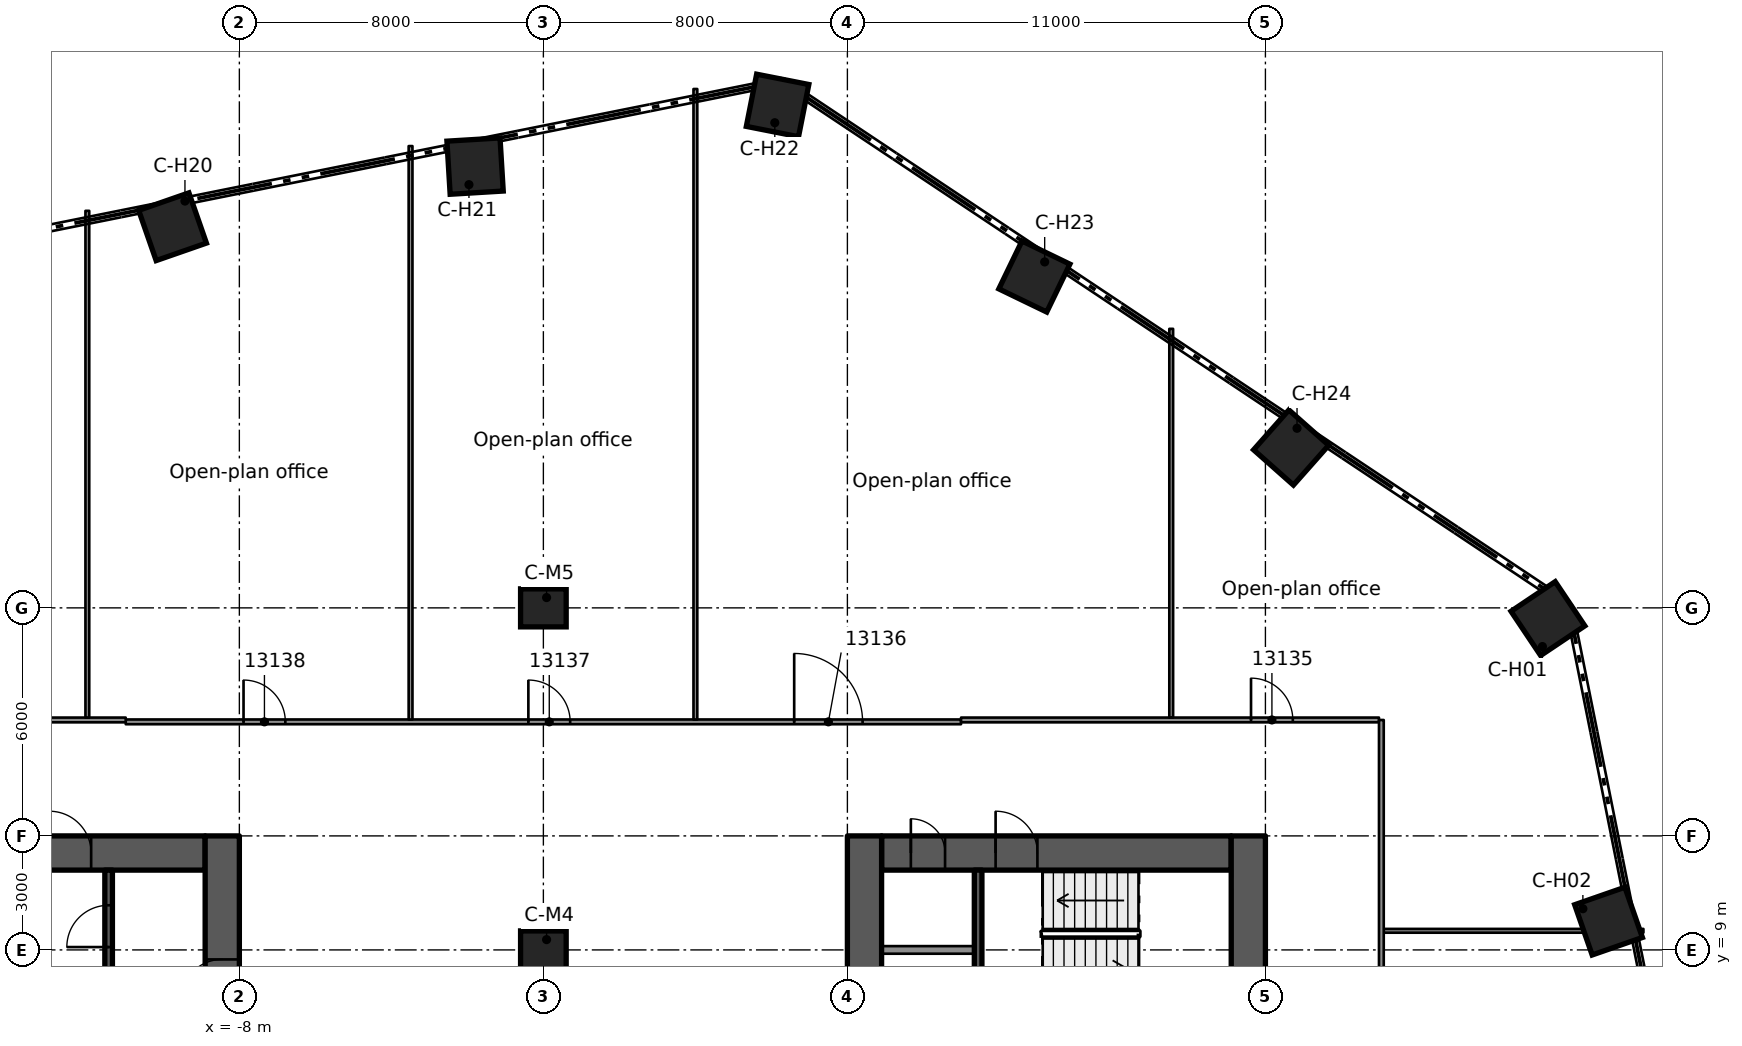
"""IFC4 building model, lengths in metres.
Left out: names, types, materials, properties, quantities, classifications, styles, units other than length and angle.
Written with IfcOpenShell. Run it as: python <this file> out.ifc"""

import sys

from ifc_helpers import new_model, si_unit, direction, frame, frame_2d, origin, origin_2d, place, context, subcontext, project, spatial, rectangle, extrude, element, fill, save


model = new_model("IFC4")
c1 = context("Model", 3, precision=1e-05, world=origin(), true_north=direction((0.0, 1.0)))
c2 = subcontext(c1, "Body", "Model", "MODEL_VIEW")
j1 = project(units=[si_unit("LENGTHUNIT", "METRE"), si_unit("PLANEANGLEUNIT", "RADIAN")], contexts=[c1])
p1 = place(None, origin())
s1 = spatial("IfcSite", under=j1, at=p1, CompositionType="ELEMENT")
p2 = place(p1, origin())
s2 = spatial("IfcBuilding", under=s1, at=p2, CompositionType="ELEMENT")
p3 = place(p2, frame((0.0, 0.0, 62.3)))
s3 = spatial("IfcBuildingStorey", under=s2, at=p3, CompositionType="ELEMENT", Elevation=62.3)
p4 = place(p3, frame((-18.1, 11.55, 0.0), z_axis=(0.0, 0.0, 1.0), x_axis=(1.0, 0.0, 0.0)))
e1 = element("IfcWall", 1, at=p4, inside=s3, PredefinedType="SHEAR", context=c2, shape_type="SweptSolid", body=[
    extrude(rectangle(XDim=9.2, YDim=0.9, at=frame_2d((4.6, 0.0))), origin(), (0.0, 0.0, 1.0), 3.5),
])
p5 = place(p4, frame((5.1, 0.0, 0.0)))
e2 = element("IfcOpeningElement", 2, at=p5, cuts=e1, PredefinedType="OPENING", context=c2, shape_type="SweptSolid", body=[
    extrude(rectangle(XDim=1.1, YDim=2.1, at=frame_2d((0.55, 1.05))), frame((0.0, 0.46, 0.0), z_axis=(0.0, -1.0, 0.0), x_axis=(1.0, 0.0, 0.0)), (0.0, 0.0, 1.0), 0.92),
])
p6 = place(p3, frame((-8.45, -12.0, 0.0), z_axis=(0.0, 0.0, 1.0), x_axis=(0.0, 1.0, 0.0)))
e3 = element("IfcWall", 3, at=p6, inside=s3, PredefinedType="SHEAR", context=c2, shape_type="SweptSolid", body=[
    extrude(rectangle(XDim=24.0, YDim=0.9, at=frame_2d((12.0, 0.0))), origin(), (0.0, 0.0, 1.0), 3.5),
])
p7 = place(p6, frame((9.6, 0.0, 0.0)))
e4 = element("IfcOpeningElement", 4, at=p7, cuts=e3, PredefinedType="OPENING", context=c2, shape_type="SweptSolid", body=[
    extrude(rectangle(XDim=1.8, YDim=2.1, at=frame_2d((0.9, 1.05))), frame((0.0, 0.46, 0.0), z_axis=(0.0, -1.0, 0.0), x_axis=(1.0, 0.0, 0.0)), (0.0, 0.0, 1.0), 0.92),
])
p8 = place(p6, frame((19.65, 0.0, 0.0)))
e5 = element("IfcOpeningElement", 5, at=p8, cuts=e3, PredefinedType="OPENING", context=c2, shape_type="SweptSolid", body=[
    extrude(rectangle(XDim=1.1, YDim=2.1, at=frame_2d((0.55, 1.05))), frame((0.0, 0.46, 0.0), z_axis=(0.0, -1.0, 0.0), x_axis=(1.0, 0.0, 0.0)), (0.0, 0.0, 1.0), 0.92),
])
p9 = place(p3, frame((8.9, 11.55, 0.0), z_axis=(0.0, 0.0, 1.0), x_axis=(1.0, 0.0, 0.0)))
e6 = element("IfcWall", 6, at=p9, inside=s3, PredefinedType="SHEAR", context=c2, shape_type="SweptSolid", body=[
    extrude(rectangle(XDim=9.2, YDim=0.9, at=frame_2d((4.6, 0.0))), origin(), (0.0, 0.0, 1.0), 3.5),
])
p10 = place(p9, frame((3.0, 0.0, 0.0)))
e7 = element("IfcOpeningElement", 7, at=p10, cuts=e6, PredefinedType="OPENING", context=c2, shape_type="SweptSolid", body=[
    extrude(rectangle(XDim=1.1, YDim=2.1, at=frame_2d((0.55, 1.05))), frame((0.0, 0.46, 0.0), z_axis=(0.0, -1.0, 0.0), x_axis=(1.0, 0.0, 0.0)), (0.0, 0.0, 1.0), 0.92),
])
p11 = place(p9, frame((0.77, 0.0, 0.0)))
e8 = element("IfcOpeningElement", 8, at=p11, cuts=e6, PredefinedType="OPENING", context=c2, shape_type="SweptSolid", body=[
    extrude(rectangle(XDim=0.9, YDim=2.1, at=frame_2d((0.45, 1.05))), frame((0.0, 0.46, 0.0), z_axis=(0.0, -1.0, 0.0), x_axis=(1.0, 0.0, 0.0)), (0.0, 0.0, 1.0), 0.92),
])
p12 = place(p3, frame((8.45, -12.0, 0.0), z_axis=(0.0, 0.0, 1.0), x_axis=(0.0, 1.0, 0.0)))
e9 = element("IfcWall", 9, at=p12, inside=s3, PredefinedType="SHEAR", context=c2, shape_type="SweptSolid", body=[
    extrude(rectangle(XDim=24.0, YDim=0.9, at=frame_2d((12.0, 0.0))), origin(), (0.0, 0.0, 1.0), 3.5),
])
p13 = place(p12, frame((12.6, 0.0, 0.0)))
e10 = element("IfcOpeningElement", 10, at=p13, cuts=e9, PredefinedType="OPENING", context=c2, shape_type="SweptSolid", body=[
    extrude(rectangle(XDim=1.8, YDim=2.1, at=frame_2d((0.9, 1.05))), frame((0.0, 0.46, 0.0), z_axis=(0.0, -1.0, 0.0), x_axis=(1.0, 0.0, 0.0)), (0.0, 0.0, 1.0), 0.92),
])
p14 = place(p12, frame((3.25, 0.0, 0.0)))
e11 = element("IfcOpeningElement", 11, at=p14, cuts=e9, PredefinedType="OPENING", context=c2, shape_type="SweptSolid", body=[
    extrude(rectangle(XDim=1.1, YDim=2.1, at=frame_2d((0.55, 1.05))), frame((0.0, 0.46, 0.0), z_axis=(0.0, -1.0, 0.0), x_axis=(1.0, 0.0, 0.0)), (0.0, 0.0, 1.0), 0.92),
])
p15 = place(p3, frame((18.55, -12.0, 0.0), z_axis=(0.0, 0.0, 1.0), x_axis=(0.0, 1.0, 0.0)))
e12 = element("IfcWall", 12, at=p15, inside=s3, PredefinedType="SHEAR", context=c2, shape_type="SweptSolid", body=[
    extrude(rectangle(XDim=24.0, YDim=0.9, at=frame_2d((12.0, 0.0))), origin(), (0.0, 0.0, 1.0), 3.5),
])
p16 = place(p15, frame((12.1, 0.0, 0.0)))
e13 = element("IfcOpeningElement", 13, at=p16, cuts=e12, PredefinedType="OPENING", context=c2, shape_type="SweptSolid", body=[
    extrude(rectangle(XDim=1.8, YDim=2.1, at=frame_2d((0.9, 1.05))), frame((0.0, 0.46, 0.0), z_axis=(0.0, -1.0, 0.0), x_axis=(1.0, 0.0, 0.0)), (0.0, 0.0, 1.0), 0.92),
])
for number, where, z_axis, x_axis in (
    (14, (26.434, 17.718, 0.0), (0.0, 0.0, 1.0), (0.831, 0.557, 0.0)),
    (15, (28.029, 9.758, 0.0), (0.0, 0.0, 1.0), (0.944, 0.329, 0.0)),
    (16, (-9.758, 28.029, 0.0), (0.0, 0.0, 1.0), (-0.329, 0.944, 0.0)),
    (17, (-1.797, 29.624, 0.0), (0.0, 0.0, 1.0), (-0.061, 0.998, 0.0)),
    (18, (6.163, 31.22, 0.0), (0.0, 0.0, 1.0), (0.194, 0.981, 0.0)),
    (19, (12.92, 26.719, 0.0), (0.0, 0.0, 1.0), (0.435, 0.9, 0.0)),
    (20, (19.677, 22.219, 0.0), (0.0, 0.0, 1.0), (0.663, 0.749, 0.0)),
):
    element("IfcColumn", number, at=place(p3, frame(where, z_axis=z_axis, x_axis=x_axis)), inside=s3, PredefinedType="COLUMN", context=c2, shape_type="SweptSolid", body=[
        extrude(rectangle(XDim=1.4, YDim=1.4, at=origin_2d()), origin(), (0.0, 0.0, 1.0), 3.5),
    ])
for number, where, z_axis, x_axis in (
    (21, (0.0, 9.0, 0.0), (0.0, 0.0, 1.0), (1.0, 0.0, 0.0)),
    (22, (0.0, 18.0, 0.0), (0.0, 0.0, 1.0), (1.0, 0.0, 0.0)),
):
    element("IfcColumn", number, at=place(p3, frame(where, z_axis=z_axis, x_axis=x_axis)), inside=s3, PredefinedType="COLUMN", context=c2, shape_type="SweptSolid", body=[
        extrude(rectangle(XDim=1.2, YDim=1.0, at=origin_2d()), origin(), (0.0, 0.0, 1.0), 3.5),
    ])
p17 = place(p3, frame((-11.44, 6.975, 0.0), z_axis=(0.0, 0.0, 1.0), x_axis=(0.0, 1.0, 0.0)))
e23 = element("IfcWall", 23, at=p17, inside=s3, PredefinedType="SOLIDWALL", context=c2, shape_type="SweptSolid", body=[
    extrude(rectangle(XDim=4.125, YDim=0.2, at=frame_2d((2.062, 0.0))), origin(), (0.0, 0.0, 1.0), 3.09),
])
p18 = place(p17, frame((2.1, 0.0, 0.0)))
e24 = element("IfcOpeningElement", 24, at=p18, cuts=e23, PredefinedType="OPENING", context=c2, shape_type="SweptSolid", body=[
    extrude(rectangle(XDim=1.1, YDim=2.1, at=frame_2d((0.55, 1.05))), frame((0.0, 0.11, 0.0), z_axis=(0.0, -1.0, 0.0), x_axis=(1.0, 0.0, 0.0)), (0.0, 0.0, 1.0), 0.22),
])
p19 = place(p3, frame((11.44, 11.1, 0.0), z_axis=(0.0, 0.0, 1.0), x_axis=(0.0, -1.0, 0.0)))
e25 = element("IfcWall", 25, at=p19, inside=s3, PredefinedType="SOLIDWALL", context=c2, shape_type="SweptSolid", body=[
    extrude(rectangle(XDim=4.125, YDim=0.2, at=frame_2d((2.062, 0.0))), origin(), (0.0, 0.0, 1.0), 3.09),
])
p20 = place(p3, frame((8.9, 9.0, 0.0), z_axis=(0.0, 0.0, 1.0), x_axis=(1.0, 0.0, 0.0)))
e26 = element("IfcWall", 26, at=p20, inside=s3, PredefinedType="PARTITIONING", context=c2, shape_type="SweptSolid", body=[
    extrude(rectangle(XDim=2.44, YDim=0.2, at=frame_2d((1.22, 0.0))), origin(), (0.0, 0.0, 1.0), 3.09),
])
p21 = place(p3, frame((22.113, 9.503, 0.0), z_axis=(0.0, 0.0, 1.0), x_axis=(1.0, 0.0, 0.0)))
e27 = element("IfcWall", 27, at=p21, inside=s3, PredefinedType="PARTITIONING", context=c2, shape_type="SweptSolid", body=[
    extrude(rectangle(XDim=6.834, YDim=0.1, at=frame_2d((3.417, 0.0))), origin(), (0.0, 0.0, 1.0), 3.08),
])
p22 = place(p3, frame((-10.99, 15.001, 0.0), z_axis=(0.0, 0.0, 1.0), x_axis=(1.0, 0.0, 0.0)))
e28 = element("IfcWall", 28, at=p22, inside=s3, PredefinedType="PARTITIONING", context=c2, shape_type="SweptSolid", body=[
    extrude(rectangle(XDim=21.98, YDim=0.125, at=frame_2d((10.99, 0.0))), origin(), (0.0, 0.0, 1.0), 3.08),
])
p23 = place(p22, frame((17.59, 0.0, 0.0)))
e29 = element("IfcOpeningElement", 29, at=p23, cuts=e28, PredefinedType="OPENING", context=c2, shape_type="SweptSolid", body=[
    extrude(rectangle(XDim=1.8, YDim=2.1, at=frame_2d((0.9, 1.05))), frame((0.0, 0.073, 0.0), z_axis=(0.0, -1.0, 0.0), x_axis=(1.0, 0.0, 0.0)), (0.0, 0.0, 1.0), 0.145),
])
p24 = place(p22, frame((10.595, 0.0, 0.0)))
e30 = element("IfcOpeningElement", 30, at=p24, cuts=e28, PredefinedType="OPENING", context=c2, shape_type="SweptSolid", body=[
    extrude(rectangle(XDim=1.1, YDim=2.1, at=frame_2d((0.55, 1.05))), frame((0.0, 0.073, 0.0), z_axis=(0.0, -1.0, 0.0), x_axis=(1.0, 0.0, 0.0)), (0.0, 0.0, 1.0), 0.145),
])
p25 = place(p22, frame((3.1, 0.0, 0.0)))
e31 = element("IfcOpeningElement", 31, at=p25, cuts=e28, PredefinedType="OPENING", context=c2, shape_type="SweptSolid", body=[
    extrude(rectangle(XDim=1.1, YDim=2.1, at=frame_2d((0.55, 1.05))), frame((0.0, 0.073, 0.0), z_axis=(0.0, -1.0, 0.0), x_axis=(1.0, 0.0, 0.0)), (0.0, 0.0, 1.0), 0.145),
])
p26 = place(p3, frame((-21.988, 15.051, 0.0), z_axis=(0.0, 0.0, 1.0), x_axis=(1.0, 0.0, 0.0)))
e32 = element("IfcWall", 32, at=p26, inside=s3, PredefinedType="PARTITIONING", context=c2, shape_type="SweptSolid", body=[
    extrude(rectangle(XDim=10.997, YDim=0.125, at=frame_2d((5.499, 0.0))), origin(), (0.0, 0.0, 1.0), 3.08),
])
p27 = place(p26, frame((4.038, 0.0, 0.0)))
e33 = element("IfcOpeningElement", 33, at=p27, cuts=e32, PredefinedType="OPENING", context=c2, shape_type="SweptSolid", body=[
    extrude(rectangle(XDim=1.8, YDim=2.1, at=frame_2d((0.9, 1.05))), frame((0.0, 0.073, 0.0), z_axis=(0.0, -1.0, 0.0), x_axis=(1.0, 0.0, 0.0)), (0.0, 0.0, 1.0), 0.145),
])
p28 = place(p3, frame((10.991, 15.051, 0.0), z_axis=(0.0, 0.0, 1.0), x_axis=(1.0, 0.0, 0.0)))
e34 = element("IfcWall", 34, at=p28, inside=s3, PredefinedType="PARTITIONING", context=c2, shape_type="SweptSolid", body=[
    extrude(rectangle(XDim=10.997, YDim=0.125, at=frame_2d((5.499, 0.0))), origin(), (0.0, 0.0, 1.0), 3.08),
])
p29 = place(p28, frame((7.63, 0.0, 0.0)))
e35 = element("IfcOpeningElement", 35, at=p29, cuts=e34, PredefinedType="OPENING", context=c2, shape_type="SweptSolid", body=[
    extrude(rectangle(XDim=1.1, YDim=2.1, at=frame_2d((0.55, 1.05))), frame((0.0, 0.073, 0.0), z_axis=(0.0, -1.0, 0.0), x_axis=(1.0, 0.0, 0.0)), (0.0, 0.0, 1.0), 0.145),
])
p30 = place(p3, frame((22.051, 15.05, 0.0), z_axis=(0.0, 0.0, 1.0), x_axis=(0.0, -1.0, 0.0)))
e36 = element("IfcWall", 36, at=p30, inside=s3, PredefinedType="PARTITIONING", context=c2, shape_type="SweptSolid", body=[
    extrude(rectangle(XDim=22.181, YDim=0.125, at=frame_2d((11.091, 0.0))), origin(), (0.0, 0.0, 1.0), 3.08),
])
p31 = place(p30, frame((15.691, 0.0, 0.0)))
e37 = element("IfcOpeningElement", 37, at=p31, cuts=e36, PredefinedType="OPENING", context=c2, shape_type="SweptSolid", body=[
    extrude(rectangle(XDim=1.8, YDim=2.1, at=frame_2d((0.9, 1.05))), frame((0.0, 0.073, 0.0), z_axis=(0.0, -1.0, 0.0), x_axis=(1.0, 0.0, 0.0)), (0.0, 0.0, 1.0), 0.145),
])
p32 = place(p30, frame((7.897, 0.0, 0.0)))
e38 = element("IfcOpeningElement", 38, at=p32, cuts=e36, PredefinedType="OPENING", context=c2, shape_type="SweptSolid", body=[
    extrude(rectangle(XDim=1.0, YDim=2.1, at=frame_2d((0.5, 1.05))), frame((0.0, 0.073, 0.0), z_axis=(0.0, -1.0, 0.0), x_axis=(1.0, 0.0, 0.0)), (0.0, 0.0, 1.0), 0.145),
])
p33 = place(p3, frame((16.521, 15.114, 0.0), z_axis=(0.0, 0.0, 1.0), x_axis=(0.0, 1.0, 0.0)))
e39 = element("IfcWall", 39, at=p33, inside=s3, PredefinedType="PARTITIONING", context=c2, shape_type="SweptSolid", body=[
    extrude(rectangle(XDim=10.228, YDim=0.1, at=frame_2d((5.114, 0.0))), origin(), (0.0, 0.0, 1.0), 3.08),
])
p34 = place(p3, frame((4.0, 15.063, 0.0), z_axis=(0.0, 0.0, 1.0), x_axis=(0.0, 1.0, 0.0)))
e40 = element("IfcWall", 40, at=p34, inside=s3, PredefinedType="PARTITIONING", context=c2, shape_type="SweptSolid", body=[
    extrude(rectangle(XDim=16.59, YDim=0.1, at=frame_2d((8.295, 0.0))), origin(), (0.0, 0.0, 1.0), 3.08),
])
p35 = place(p3, frame((-3.495, 15.063, 0.0), z_axis=(0.0, 0.0, 1.0), x_axis=(0.0, 1.0, 0.0)))
e41 = element("IfcWall", 41, at=p35, inside=s3, PredefinedType="PARTITIONING", context=c2, shape_type="SweptSolid", body=[
    extrude(rectangle(XDim=15.088, YDim=0.1, at=frame_2d((7.544, 0.0))), origin(), (0.0, 0.0, 1.0), 3.08),
])
p36 = place(p3, frame((-12.0, 15.114, 0.0), z_axis=(0.0, 0.0, 1.0), x_axis=(0.0, 1.0, 0.0)))
e42 = element("IfcWall", 42, at=p36, inside=s3, PredefinedType="PARTITIONING", context=c2, shape_type="SweptSolid", body=[
    extrude(rectangle(XDim=13.333, YDim=0.1, at=frame_2d((6.667, 0.0))), origin(), (0.0, 0.0, 1.0), 3.08),
])
p37 = place(p8, origin())
e43 = element("IfcDoor", 43, at=p37, inside=s3, OperationType="SINGLE_SWING_RIGHT", PredefinedType="DOOR", context=c2, shape_type="SweptSolid", body=[
    extrude(rectangle(XDim=1.1, YDim=2.1, at=frame_2d((0.55, 1.05))), frame((0.0, 0.025, 0.0), z_axis=(0.0, -1.0, 0.0), x_axis=(1.0, 0.0, 0.0)), (0.0, 0.0, 1.0), 0.05),
])
fill(e5, e43)
p38 = place(p5, origin())
e44 = element("IfcDoor", 44, at=p38, inside=s3, OperationType="SINGLE_SWING_RIGHT", PredefinedType="DOOR", context=c2, shape_type="SweptSolid", body=[
    extrude(rectangle(XDim=1.1, YDim=2.1, at=frame_2d((0.55, 1.05))), frame((0.0, 0.025, 0.0), z_axis=(0.0, -1.0, 0.0), x_axis=(1.0, 0.0, 0.0)), (0.0, 0.0, 1.0), 0.05),
])
fill(e2, e44)
p39 = place(p18, origin())
e45 = element("IfcDoor", 45, at=p39, inside=s3, OperationType="SINGLE_SWING_RIGHT", PredefinedType="DOOR", context=c2, shape_type="SweptSolid", body=[
    extrude(rectangle(XDim=1.1, YDim=2.1, at=frame_2d((0.55, 1.05))), frame((0.0, 0.025, 0.0), z_axis=(0.0, -1.0, 0.0), x_axis=(1.0, 0.0, 0.0)), (0.0, 0.0, 1.0), 0.05),
])
fill(e24, e45)
p40 = place(p10, origin())
e46 = element("IfcDoor", 46, at=p40, inside=s3, OperationType="SINGLE_SWING_LEFT", PredefinedType="DOOR", context=c2, shape_type="SweptSolid", body=[
    extrude(rectangle(XDim=1.1, YDim=2.1, at=frame_2d((0.55, 1.05))), frame((0.0, 0.025, 0.0), z_axis=(0.0, -1.0, 0.0), x_axis=(1.0, 0.0, 0.0)), (0.0, 0.0, 1.0), 0.05),
])
fill(e7, e46)
p41 = place(p11, origin())
e47 = element("IfcDoor", 47, at=p41, inside=s3, OperationType="SINGLE_SWING_LEFT", PredefinedType="DOOR", context=c2, shape_type="SweptSolid", body=[
    extrude(rectangle(XDim=0.9, YDim=2.1, at=frame_2d((0.45, 1.05))), frame((0.0, 0.025, 0.0), z_axis=(0.0, -1.0, 0.0), x_axis=(1.0, 0.0, 0.0)), (0.0, 0.0, 1.0), 0.05),
])
fill(e8, e47)
p42 = place(p29, origin())
e48 = element("IfcDoor", 48, at=p42, inside=s3, OperationType="SINGLE_SWING_RIGHT", PredefinedType="DOOR", context=c2, shape_type="SweptSolid", body=[
    extrude(rectangle(XDim=1.1, YDim=2.1, at=frame_2d((0.55, 1.05))), frame((0.0, 0.025, 0.0), z_axis=(0.0, -1.0, 0.0), x_axis=(1.0, 0.0, 0.0)), (0.0, 0.0, 1.0), 0.05),
])
fill(e35, e48)
p43 = place(p23, origin())
e49 = element("IfcDoor", 49, at=p43, inside=s3, OperationType="DOUBLE_DOOR_SINGLE_SWING", PredefinedType="DOOR", context=c2, shape_type="SweptSolid", body=[
    extrude(rectangle(XDim=1.8, YDim=2.1, at=frame_2d((0.9, 1.05))), frame((0.0, 0.025, 0.0), z_axis=(0.0, -1.0, 0.0), x_axis=(1.0, 0.0, 0.0)), (0.0, 0.0, 1.0), 0.05),
])
fill(e29, e49)
p44 = place(p24, origin())
e50 = element("IfcDoor", 50, at=p44, inside=s3, OperationType="SINGLE_SWING_RIGHT", PredefinedType="DOOR", context=c2, shape_type="SweptSolid", body=[
    extrude(rectangle(XDim=1.1, YDim=2.1, at=frame_2d((0.55, 1.05))), frame((0.0, 0.025, 0.0), z_axis=(0.0, -1.0, 0.0), x_axis=(1.0, 0.0, 0.0)), (0.0, 0.0, 1.0), 0.05),
])
fill(e30, e50)
p45 = place(p25, origin())
e51 = element("IfcDoor", 51, at=p45, inside=s3, OperationType="SINGLE_SWING_LEFT", PredefinedType="DOOR", context=c2, shape_type="SweptSolid", body=[
    extrude(rectangle(XDim=1.1, YDim=2.1, at=frame_2d((0.55, 1.05))), frame((0.0, 0.025, 0.0), z_axis=(0.0, -1.0, 0.0), x_axis=(1.0, 0.0, 0.0)), (0.0, 0.0, 1.0), 0.05),
])
fill(e31, e51)
save(model, sys.argv[1])
